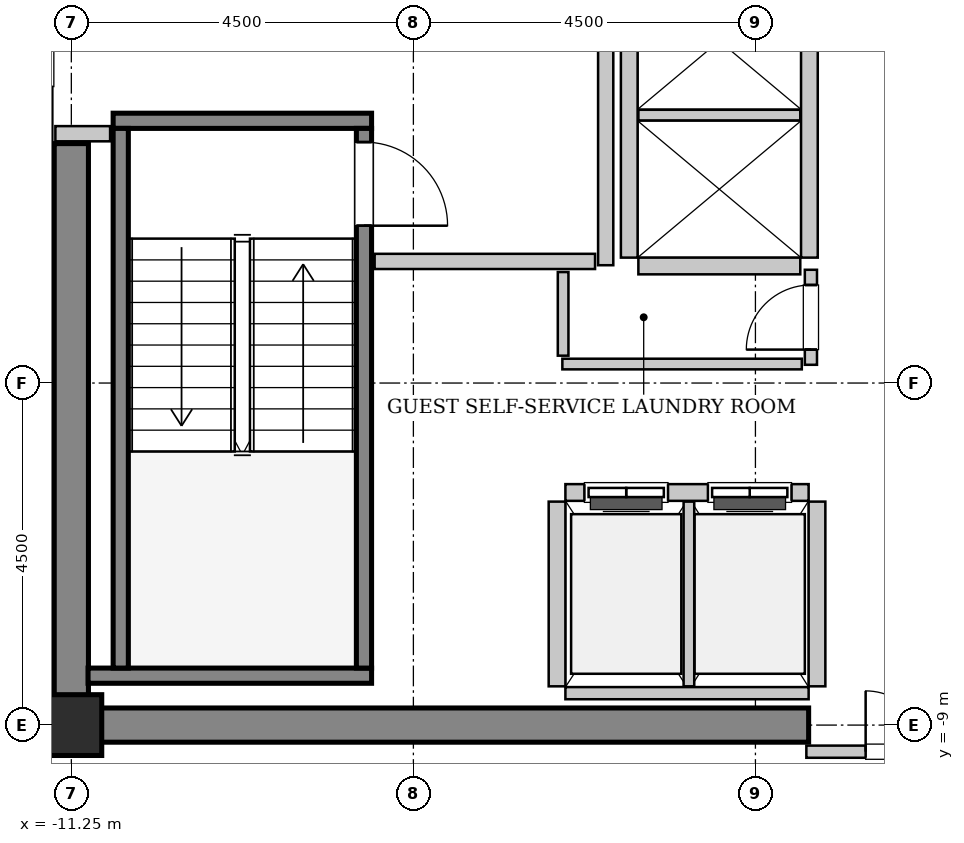
"""IFC4 building model, lengths in metres.
Left out: names, types, materials, properties, quantities, classifications, styles, units other than length and angle.
Written with IfcOpenShell. Run it as: python <this file> out.ifc"""

import sys

from ifc_helpers import new_model, si_unit, direction, frame, frame_2d, origin, origin_2d, place, context, subcontext, project, spatial, rectangle, hollow_rectangle, extrude, source, transform, mapped, element, fill, save


model = new_model("IFC4")
c1 = context("Model", 3, precision=1e-05, world=origin(), true_north=direction((0.0, 1.0)))
c2 = subcontext(c1, "Body", "Model", "MODEL_VIEW")
j1 = project(units=[si_unit("LENGTHUNIT", "METRE"), si_unit("PLANEANGLEUNIT", "RADIAN")], contexts=[c1])
p1 = place(None, origin())
s1 = spatial("IfcSite", under=j1, at=p1, CompositionType="ELEMENT")
p2 = place(p1, origin())
s2 = spatial("IfcBuilding", under=s1, at=p2, CompositionType="ELEMENT")
p3 = place(p2, frame((0.0, 0.0, 218.0)))
s3 = spatial("IfcBuildingStorey", under=s2, at=p3, CompositionType="ELEMENT", Elevation=218.0)
m1 = source(origin(), c2, "Body", "SweptSolid", [
    extrude(rectangle(XDim=9.925, YDim=0.45, at=frame_2d((4.962, 0.0))), origin(), (0.0, 0.0, 1.0), 3.8),
])
p4 = place(p3, frame((-11.475, -9.0, 0.0), z_axis=(0.0, 0.0, 1.0), x_axis=(1.0, 0.0, 0.0)))
e1 = element("IfcWall", 1, at=p4, inside=s3, PredefinedType="SHEAR", context=c2, shape_type="MappedRepresentation", body=[
    mapped(m1, transform((0.0, 0.0, 0.0), x_axis=(1.0, 0.0, 0.0), y_axis=(0.0, 1.0, 0.0), z_axis=(0.0, 0.0, 1.0), scale=1.0)),
])
m2 = source(origin(), c2, "Body", "SweptSolid", [
    extrude(rectangle(XDim=7.425, YDim=0.45, at=frame_2d((3.712, 0.0))), origin(), (0.0, 0.0, 1.0), 3.8),
])
p5 = place(p3, frame((-11.25, -8.775, 0.0), z_axis=(0.0, 0.0, 1.0), x_axis=(0.0, 1.0, 0.0)))
e2 = element("IfcWall", 2, at=p5, inside=s3, PredefinedType="SHEAR", context=c2, shape_type="MappedRepresentation", body=[
    mapped(m2, transform((0.0, 0.0, 0.0), x_axis=(1.0, 0.0, 0.0), y_axis=(0.0, 1.0, 0.0), z_axis=(0.0, 0.0, 1.0), scale=1.0)),
])
m3 = source(origin(), c2, "Body", "SweptSolid", [
    extrude(hollow_rectangle(XDim=0.8, YDim=0.8, WallThickness=0.04, InnerFilletRadius=0.04, OuterFilletRadius=0.08, at=origin_2d()), origin(), (0.0, 0.0, 1.0), 3.8),
])
p6 = place(p3, frame((-11.25, -9.0, 0.0), z_axis=(0.0, 0.0, 1.0), x_axis=(1.0, 0.0, 0.0)))
e3 = element("IfcColumn", 3, at=p6, inside=s3, PredefinedType="COLUMN", context=c2, shape_type="MappedRepresentation", body=[
    mapped(m3, transform((0.0, 0.0, 0.0), x_axis=(1.0, 0.0, 0.0), y_axis=(0.0, 1.0, 0.0), z_axis=(0.0, 0.0, 1.0), scale=1.0)),
])
m4 = source(origin(), c2, "Body", "SweptSolid", [
    extrude(rectangle(XDim=3.4, YDim=0.2, at=frame_2d((1.7, 0.0))), origin(), (0.0, 0.0, 1.0), 3.8),
])
p7 = place(p3, frame((-10.7, -1.05, 0.0), z_axis=(0.0, 0.0, 1.0), x_axis=(1.0, 0.0, 0.0)))
e4 = element("IfcWall", 4, at=p7, inside=s3, PredefinedType="SOLIDWALL", context=c2, shape_type="MappedRepresentation", body=[
    mapped(m4, transform((0.0, 0.0, 0.0), x_axis=(1.0, 0.0, 0.0), y_axis=(0.0, 1.0, 0.0), z_axis=(0.0, 0.0, 1.0), scale=1.0)),
])
m5 = source(origin(), c2, "Body", "SweptSolid", [
    extrude(rectangle(XDim=3.73, YDim=0.2, at=frame_2d((1.865, 0.0))), origin(), (0.0, 0.0, 1.0), 3.8),
])
p8 = place(p3, frame((-11.03, -8.35, 0.0), z_axis=(0.0, 0.0, 1.0), x_axis=(1.0, 0.0, 0.0)))
e5 = element("IfcWall", 5, at=p8, inside=s3, PredefinedType="SOLIDWALL", context=c2, shape_type="MappedRepresentation", body=[
    mapped(m5, transform((0.0, 0.0, 0.0), x_axis=(1.0, 0.0, 0.0), y_axis=(0.0, 1.0, 0.0), z_axis=(0.0, 0.0, 1.0), scale=1.0)),
])
m6 = source(origin(), c2, "Body", "SweptSolid", [
    extrude(rectangle(XDim=7.1, YDim=0.2, at=frame_2d((3.55, 0.0))), origin(), (0.0, 0.0, 1.0), 3.8),
])
p9 = place(p3, frame((-10.6, -1.15, 0.0), z_axis=(0.0, 0.0, 1.0), x_axis=(0.0, -1.0, 0.0)))
e6 = element("IfcWall", 6, at=p9, inside=s3, PredefinedType="SOLIDWALL", context=c2, shape_type="MappedRepresentation", body=[
    mapped(m6, transform((0.0, 0.0, 0.0), x_axis=(1.0, 0.0, 0.0), y_axis=(0.0, 1.0, 0.0), z_axis=(0.0, 0.0, 1.0), scale=1.0)),
])
p10 = place(p3, frame((-7.4, -1.15, 0.0), z_axis=(0.0, 0.0, 1.0), x_axis=(0.0, -1.0, 0.0)))
e7 = element("IfcWall", 7, at=p10, inside=s3, PredefinedType="SOLIDWALL", context=c2, shape_type="MappedRepresentation", body=[
    mapped(m6, transform((0.0, 0.0, 0.0), x_axis=(1.0, 0.0, 0.0), y_axis=(0.0, 1.0, 0.0), z_axis=(0.0, 0.0, 1.0), scale=1.0)),
])
p11 = place(p10, frame((0.18, 0.0, 0.0)))
e8 = element("IfcOpeningElement", 8, at=p11, cuts=e7, PredefinedType="OPENING", context=c2, shape_type="SweptSolid", body=[
    extrude(rectangle(XDim=1.1, YDim=2.15, at=frame_2d((0.55, 1.075))), frame((0.0, 0.11, 0.0), z_axis=(0.0, -1.0, 0.0), x_axis=(1.0, 0.0, 0.0)), (0.0, 0.0, 1.0), 0.22),
])
m7 = source(origin(), c2, "Body", "SweptSolid", [
    extrude(rectangle(XDim=3.2, YDim=0.22, at=frame_2d((1.6, 0.0))), origin(), (0.0, 0.0, 1.0), 3.535),
])
p12 = place(p3, frame((-1.55, -5.94, 0.0), z_axis=(0.0, 0.0, 1.0), x_axis=(-1.0, 0.0, 0.0)))
e9 = element("IfcWall", 9, at=p12, inside=s3, PredefinedType="SOLIDWALL", context=c2, shape_type="MappedRepresentation", body=[
    mapped(m7, transform((0.0, 0.0, 0.0), x_axis=(1.0, 0.0, 0.0), y_axis=(0.0, 1.0, 0.0), z_axis=(0.0, 0.0, 1.0), scale=1.0)),
])
p13 = place(p12, frame((1.85, 0.0, 0.0)))
e10 = element("IfcOpeningElement", 10, at=p13, cuts=e9, PredefinedType="OPENING", context=c2, shape_type="SweptSolid", body=[
    extrude(rectangle(XDim=1.1, YDim=2.2, at=frame_2d((0.55, 1.1))), frame((0.0, 0.12, 0.0), z_axis=(0.0, -1.0, 0.0), x_axis=(1.0, 0.0, 0.0)), (0.0, 0.0, 1.0), 0.24),
])
p14 = place(p12, frame((0.225, 0.0, 0.0)))
e11 = element("IfcOpeningElement", 11, at=p14, cuts=e9, PredefinedType="OPENING", context=c2, shape_type="SweptSolid", body=[
    extrude(rectangle(XDim=1.1, YDim=2.2, at=frame_2d((0.55, 1.1))), frame((0.0, 0.12, 0.0), z_axis=(0.0, -1.0, 0.0), x_axis=(1.0, 0.0, 0.0)), (0.0, 0.0, 1.0), 0.24),
])
m8 = source(origin(), c2, "Body", "SweptSolid", [
    extrude(rectangle(XDim=3.2, YDim=0.16, at=frame_2d((1.6, 0.0))), origin(), (0.0, 0.0, 1.0), 2.625),
])
p15 = place(p3, frame((-4.75, -8.58, 0.0), z_axis=(0.0, 0.0, 1.0), x_axis=(1.0, 0.0, 0.0)))
e12 = element("IfcWall", 12, at=p15, inside=s3, PredefinedType="PARTITIONING", context=c2, shape_type="MappedRepresentation", body=[
    mapped(m8, transform((0.0, 0.0, 0.0), x_axis=(1.0, 0.0, 0.0), y_axis=(0.0, 1.0, 0.0), z_axis=(0.0, 0.0, 1.0), scale=1.0)),
])
m9 = source(origin(), c2, "Body", "SweptSolid", [
    extrude(rectangle(XDim=2.43, YDim=0.22, at=frame_2d((1.215, 0.0))), origin(), (0.0, 0.0, 1.0), 3.535),
])
p16 = place(p3, frame((-4.86, -6.06, 0.0), z_axis=(0.0, 0.0, 1.0), x_axis=(0.0, -1.0, 0.0)))
e13 = element("IfcWall", 13, at=p16, inside=s3, PredefinedType="SOLIDWALL", context=c2, shape_type="MappedRepresentation", body=[
    mapped(m9, transform((0.0, 0.0, 0.0), x_axis=(1.0, 0.0, 0.0), y_axis=(0.0, 1.0, 0.0), z_axis=(0.0, 0.0, 1.0), scale=1.0)),
])
m10 = source(origin(), c2, "Body", "SweptSolid", [
    extrude(rectangle(XDim=2.43, YDim=0.14, at=frame_2d((1.215, 0.0))), origin(), (0.0, 0.0, 1.0), 3.535),
])
p17 = place(p3, frame((-3.125, -8.49, 0.0), z_axis=(0.0, 0.0, 1.0), x_axis=(0.0, 1.0, 0.0)))
e14 = element("IfcWall", 14, at=p17, inside=s3, PredefinedType="PARTITIONING", context=c2, shape_type="MappedRepresentation", body=[
    mapped(m10, transform((0.0, 0.0, 0.0), x_axis=(1.0, 0.0, 0.0), y_axis=(0.0, 1.0, 0.0), z_axis=(0.0, 0.0, 1.0), scale=1.0)),
])
p18 = place(p3, frame((-1.44, -8.49, 0.0), z_axis=(0.0, 0.0, 1.0), x_axis=(0.0, 1.0, 0.0)))
e15 = element("IfcWall", 15, at=p18, inside=s3, PredefinedType="SOLIDWALL", context=c2, shape_type="MappedRepresentation", body=[
    mapped(m9, transform((0.0, 0.0, 0.0), x_axis=(1.0, 0.0, 0.0), y_axis=(0.0, 1.0, 0.0), z_axis=(0.0, 0.0, 1.0), scale=1.0)),
])
m11 = source(origin(), c2, "Body", "SweptSolid", [
    extrude(rectangle(XDim=5.7, YDim=0.22, at=frame_2d((2.85, 0.0))), origin(), (0.0, 0.0, 1.0), 3.535),
])
for number, where, z_axis, x_axis in (
    (16, (-1.54, -2.85, 0.0), (0.0, 0.0, 1.0), (0.0, 1.0, 0.0)),
    (17, (-3.91, 2.85, 0.0), (0.0, 0.0, 1.0), (0.0, -1.0, 0.0)),
):
    element("IfcWall", number, at=place(p3, frame(where, z_axis=z_axis, x_axis=x_axis)), inside=s3, PredefinedType="SOLIDWALL", context=c2, shape_type="MappedRepresentation", body=[
        mapped(m11, transform((0.0, 0.0, 0.0), x_axis=(1.0, 0.0, 0.0), y_axis=(0.0, 1.0, 0.0), z_axis=(0.0, 0.0, 1.0), scale=1.0)),
    ])
m12 = source(origin(), c2, "Body", "SweptSolid", [
    extrude(rectangle(XDim=2.13, YDim=0.22, at=frame_2d((1.065, 0.0))), origin(), (0.0, 0.0, 1.0), 3.535),
])
p19 = place(p3, frame((-3.79, -2.96, 0.0), z_axis=(0.0, 0.0, 1.0), x_axis=(1.0, 0.0, 0.0)))
e18 = element("IfcWall", 18, at=p19, inside=s3, PredefinedType="SOLIDWALL", context=c2, shape_type="MappedRepresentation", body=[
    mapped(m12, transform((0.0, 0.0, 0.0), x_axis=(1.0, 0.0, 0.0), y_axis=(0.0, 1.0, 0.0), z_axis=(0.0, 0.0, 1.0), scale=1.0)),
])
m13 = source(origin(), c2, "Body", "SweptSolid", [
    extrude(rectangle(XDim=2.13, YDim=0.14, at=frame_2d((1.065, 0.0))), origin(), (0.0, 0.0, 1.0), 3.535),
])
p20 = place(p3, frame((-3.79, -0.975, 0.0), z_axis=(0.0, 0.0, 1.0), x_axis=(1.0, 0.0, 0.0)))
e19 = element("IfcWall", 19, at=p20, inside=s3, PredefinedType="PARTITIONING", context=c2, shape_type="MappedRepresentation", body=[
    mapped(m13, transform((0.0, 0.0, 0.0), x_axis=(1.0, 0.0, 0.0), y_axis=(0.0, 1.0, 0.0), z_axis=(0.0, 0.0, 1.0), scale=1.0)),
])
m14 = source(origin(), c2, "Body", "SweptSolid", [
    extrude(rectangle(XDim=5.9, YDim=0.2, at=frame_2d((2.95, 0.0))), origin(), (0.0, 0.0, 1.0), 3.535),
])
p21 = place(p3, frame((-4.22, -2.95, 0.0), z_axis=(0.0, 0.0, 1.0), x_axis=(0.0, 1.0, 0.0)))
e20 = element("IfcWall", 20, at=p21, inside=s3, PredefinedType="PARTITIONING", context=c2, shape_type="MappedRepresentation", body=[
    mapped(m14, transform((0.0, 0.0, 0.0), x_axis=(1.0, 0.0, 0.0), y_axis=(0.0, 1.0, 0.0), z_axis=(0.0, 0.0, 1.0), scale=1.0)),
])
m15 = source(origin(), c2, "Body", "SweptSolid", [
    extrude(rectangle(XDim=2.9, YDim=0.2, at=frame_2d((1.45, 0.0))), origin(), (0.0, 0.0, 1.0), 3.535),
])
p22 = place(p3, frame((-7.26, -2.9, 0.0), z_axis=(0.0, 0.0, 1.0), x_axis=(1.0, 0.0, 0.0)))
e21 = element("IfcWall", 21, at=p22, inside=s3, PredefinedType="PARTITIONING", context=c2, shape_type="MappedRepresentation", body=[
    mapped(m15, transform((0.0, 0.0, 0.0), x_axis=(1.0, 0.0, 0.0), y_axis=(0.0, 1.0, 0.0), z_axis=(0.0, 0.0, 1.0), scale=1.0)),
])
m16 = source(origin(), c2, "Body", "SweptSolid", [
    extrude(rectangle(XDim=0.72, YDim=0.2, at=frame_2d((0.36, 0.0))), origin(), (0.0, 0.0, 1.0), 3.535),
])
p23 = place(p3, frame((-11.46, -1.22, 0.0), z_axis=(0.0, 0.0, 1.0), x_axis=(1.0, 0.0, 0.0)))
e22 = element("IfcWall", 22, at=p23, inside=s3, PredefinedType="PARTITIONING", context=c2, shape_type="MappedRepresentation", body=[
    mapped(m16, transform((0.0, 0.0, 0.0), x_axis=(1.0, 0.0, 0.0), y_axis=(0.0, 1.0, 0.0), z_axis=(0.0, 0.0, 1.0), scale=1.0)),
])
m17 = source(origin(), c2, "Body", "SweptSolid", [
    extrude(rectangle(XDim=3.16, YDim=0.16, at=frame_2d((1.58, 0.0))), origin(), (0.0, 0.0, 1.0), 2.625),
])
p24 = place(p3, frame((-1.58, -9.35, 0.0), z_axis=(0.0, 0.0, 1.0), x_axis=(1.0, 0.0, 0.0)))
e23 = element("IfcWall", 23, at=p24, inside=s3, PredefinedType="PARTITIONING", context=c2, shape_type="MappedRepresentation", body=[
    mapped(m17, transform((0.0, 0.0, 0.0), x_axis=(1.0, 0.0, 0.0), y_axis=(0.0, 1.0, 0.0), z_axis=(0.0, 0.0, 1.0), scale=1.0)),
])
p25 = place(p24, frame((0.78, 0.0, 0.0)))
e24 = element("IfcOpeningElement", 24, at=p25, cuts=e23, PredefinedType="OPENING", context=c2, shape_type="SweptSolid", body=[
    extrude(rectangle(XDim=1.6, YDim=2.3, at=frame_2d((0.8, 1.15))), frame((0.0, 0.09, 0.0), z_axis=(0.0, -1.0, 0.0), x_axis=(1.0, 0.0, 0.0)), (0.0, 0.0, 1.0), 0.18),
])
m18 = source(origin(), c2, "Body", "SweptSolid", [
    extrude(rectangle(XDim=1.25, YDim=0.16, at=frame_2d((0.625, 0.0))), origin(), (0.0, 0.0, 1.0), 3.535),
])
p26 = place(p3, frame((-1.52, -4.26, 0.0), z_axis=(0.0, 0.0, 1.0), x_axis=(0.0, 1.0, 0.0)))
e25 = element("IfcWall", 25, at=p26, inside=s3, PredefinedType="PARTITIONING", context=c2, shape_type="MappedRepresentation", body=[
    mapped(m18, transform((0.0, 0.0, 0.0), x_axis=(1.0, 0.0, 0.0), y_axis=(0.0, 1.0, 0.0), z_axis=(0.0, 0.0, 1.0), scale=1.0)),
])
p27 = place(p26, frame((0.2, 0.0, 0.0)))
e26 = element("IfcOpeningElement", 26, at=p27, cuts=e25, PredefinedType="OPENING", context=c2, shape_type="SweptSolid", body=[
    extrude(rectangle(XDim=0.85, YDim=2.1, at=frame_2d((0.425, 1.05))), frame((0.0, 0.09, 0.0), z_axis=(0.0, -1.0, 0.0), x_axis=(1.0, 0.0, 0.0)), (0.0, 0.0, 1.0), 0.18),
])
m19 = source(origin(), c2, "Body", "SweptSolid", [
    extrude(rectangle(XDim=3.15, YDim=0.14, at=frame_2d((1.575, 0.0))), origin(), (0.0, 0.0, 1.0), 3.535),
])
p28 = place(p3, frame((-4.79, -4.25, 0.0), z_axis=(0.0, 0.0, 1.0), x_axis=(1.0, 0.0, 0.0)))
e27 = element("IfcWall", 27, at=p28, inside=s3, PredefinedType="PARTITIONING", context=c2, shape_type="MappedRepresentation", body=[
    mapped(m19, transform((0.0, 0.0, 0.0), x_axis=(1.0, 0.0, 0.0), y_axis=(0.0, 1.0, 0.0), z_axis=(0.0, 0.0, 1.0), scale=1.0)),
])
m20 = source(origin(), c2, "Body", "SweptSolid", [
    extrude(rectangle(XDim=1.1, YDim=0.14, at=frame_2d((0.55, 0.0))), origin(), (0.0, 0.0, 1.0), 3.535),
])
p29 = place(p3, frame((-4.78, -4.14, 0.0), z_axis=(0.0, 0.0, 1.0), x_axis=(0.0, 1.0, 0.0)))
e28 = element("IfcWall", 28, at=p29, inside=s3, PredefinedType="PARTITIONING", context=c2, shape_type="MappedRepresentation", body=[
    mapped(m20, transform((0.0, 0.0, 0.0), x_axis=(1.0, 0.0, 0.0), y_axis=(0.0, 1.0, 0.0), z_axis=(0.0, 0.0, 1.0), scale=1.0)),
])
m21 = source(origin(), c2, "Body", "SweptSolid", [
    extrude(rectangle(XDim=1.1, YDim=2.15, at=frame_2d((0.55, 1.075))), frame((0.0, 0.025, 0.0), z_axis=(0.0, -1.0, 0.0), x_axis=(1.0, 0.0, 0.0)), (0.0, 0.0, 1.0), 0.05),
])
p30 = place(p11, origin())
e29 = element("IfcDoor", 29, at=p30, inside=s3, OperationType="SINGLE_SWING_RIGHT", PredefinedType="DOOR", context=c2, shape_type="MappedRepresentation", body=[
    mapped(m21, transform((0.0, 0.0, 0.0), x_axis=(1.0, 0.0, 0.0), y_axis=(0.0, 1.0, 0.0), z_axis=(0.0, 0.0, 1.0), scale=1.0)),
])
fill(e8, e29)
m22 = source(origin(), c2, "Body", "SweptSolid", [
    extrude(rectangle(XDim=1.1, YDim=2.2, at=frame_2d((0.55, 1.1))), frame((0.0, 0.025, 0.0), z_axis=(0.0, -1.0, 0.0), x_axis=(1.0, 0.0, 0.0)), (0.0, 0.0, 1.0), 0.05),
])
p31 = place(p13, origin())
e30 = element("IfcDoor", 30, at=p31, inside=s3, OperationType="DOUBLE_DOOR_SLIDING", PredefinedType="DOOR", context=c2, shape_type="MappedRepresentation", body=[
    mapped(m22, transform((0.0, 0.0, 0.0), x_axis=(1.0, 0.0, 0.0), y_axis=(0.0, 1.0, 0.0), z_axis=(0.0, 0.0, 1.0), scale=1.0)),
])
fill(e10, e30)
p32 = place(p14, origin())
e31 = element("IfcDoor", 31, at=p32, inside=s3, OperationType="DOUBLE_DOOR_SLIDING", PredefinedType="DOOR", context=c2, shape_type="MappedRepresentation", body=[
    mapped(m22, transform((0.0, 0.0, 0.0), x_axis=(1.0, 0.0, 0.0), y_axis=(0.0, 1.0, 0.0), z_axis=(0.0, 0.0, 1.0), scale=1.0)),
])
fill(e11, e31)
m23 = source(origin(), c2, "Body", "SweptSolid", [
    extrude(rectangle(XDim=1.6, YDim=2.3, at=frame_2d((0.8, 1.15))), frame((0.0, 0.025, 0.0), z_axis=(0.0, -1.0, 0.0), x_axis=(1.0, 0.0, 0.0)), (0.0, 0.0, 1.0), 0.05),
])
p33 = place(p25, origin())
e32 = element("IfcDoor", 32, at=p33, inside=s3, OperationType="DOUBLE_DOOR_SINGLE_SWING", PredefinedType="DOOR", context=c2, shape_type="MappedRepresentation", body=[
    mapped(m23, transform((0.0, 0.0, 0.0), x_axis=(1.0, 0.0, 0.0), y_axis=(0.0, 1.0, 0.0), z_axis=(0.0, 0.0, 1.0), scale=1.0)),
])
fill(e24, e32)
m24 = source(origin(), c2, "Body", "SweptSolid", [
    extrude(rectangle(XDim=0.85, YDim=2.1, at=frame_2d((0.425, 1.05))), frame((0.0, 0.025, 0.0), z_axis=(0.0, -1.0, 0.0), x_axis=(1.0, 0.0, 0.0)), (0.0, 0.0, 1.0), 0.05),
])
p34 = place(p27, origin())
e33 = element("IfcDoor", 33, at=p34, inside=s3, OperationType="SINGLE_SWING_LEFT", PredefinedType="DOOR", context=c2, shape_type="MappedRepresentation", body=[
    mapped(m24, transform((0.0, 0.0, 0.0), x_axis=(1.0, 0.0, 0.0), y_axis=(0.0, 1.0, 0.0), z_axis=(0.0, 0.0, 1.0), scale=1.0)),
])
fill(e26, e33)
save(model, sys.argv[1])
